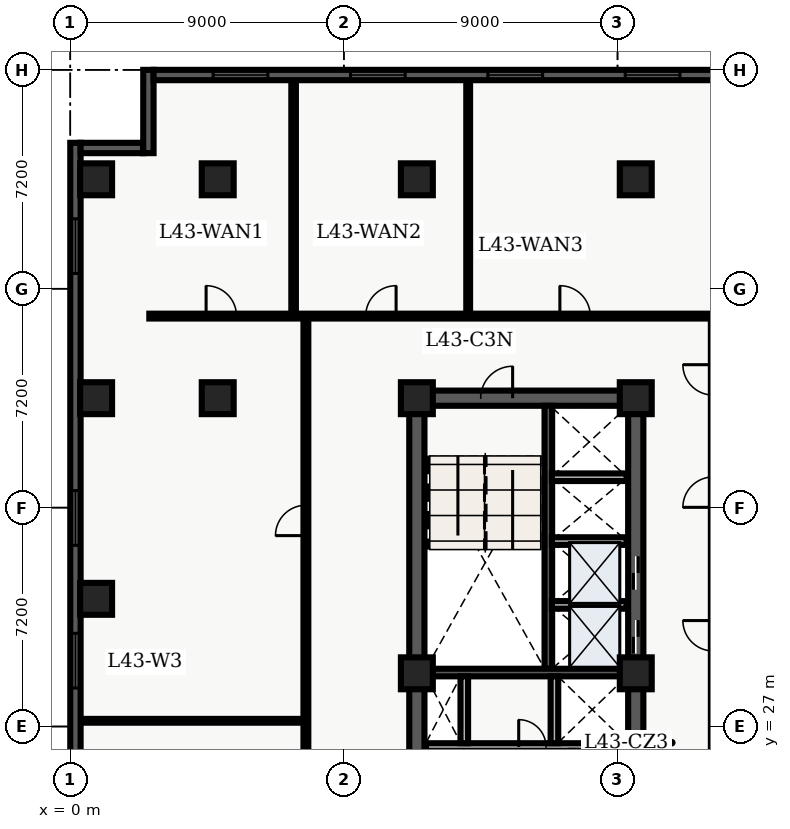
"""IFC4 building model, lengths in metres.
Left out: names, types, materials, properties, quantities, classifications, styles, units other than length and angle.
Written with IfcOpenShell. Run it as: python <this file> out.ifc"""

import sys

from ifc_helpers import new_model, entity, si_unit, converted_unit, direction, frame, origin_with_axes, origin_2d_with_axis, place, context, subcontext, project, spatial, polyline, rectangle, outline, extrude, element, fill, save


model = new_model("IFC4")
c1 = context("Model", 3, precision=1e-05, world=origin_with_axes(), true_north=direction((0.0, 1.0)))
c2 = subcontext(c1, "Body", "Model", "MODEL_VIEW")
j1 = project(units=[si_unit("LENGTHUNIT", "METRE"), converted_unit("PLANEANGLEUNIT", "DEGREE", entity("IfcPlaneAngleMeasure", 0.017), si_unit("PLANEANGLEUNIT", "RADIAN"), dimensions=[0, 0, 0, 0, 0, 0, 0])], contexts=[c1])
p1 = place(None, origin_with_axes())
s1 = spatial("IfcSite", under=j1, at=p1, CompositionType="ELEMENT")
p2 = place(p1, origin_with_axes())
s2 = spatial("IfcBuilding", under=s1, at=p2, CompositionType="ELEMENT")
p3 = place(p2, frame((0.0, 0.0, 175.8), z_axis=(0.0, 0.0, 1.0), x_axis=(1.0, 0.0, 0.0)))
s3 = spatial("IfcBuildingStorey", under=s2, at=p3, CompositionType="ELEMENT", Elevation=175.8)
p4 = place(p3, frame((11.4, 10.8, 0.0), z_axis=(0.0, 0.0, 1.0), x_axis=(0.0, 1.0, 0.0)))
e1 = element("IfcWall", 1, at=p4, inside=s3, PredefinedType="SHEAR", context=c2, shape_type="SweptSolid", body=[
    extrude(outline(polyline([(0.0, -0.25), (27.0, -0.25), (27.0, 0.25), (0.0, 0.25), (0.0, -0.25)])), origin_with_axes(), (0.0, 0.0, 1.0), 3.66),
])
p5 = place(p3, frame((11.4, 37.8, 0.0), z_axis=(0.0, 0.0, 1.0), x_axis=(1.0, 0.0, 0.0)))
e2 = element("IfcWall", 2, at=p5, inside=s3, PredefinedType="SHEAR", context=c2, shape_type="SweptSolid", body=[
    extrude(outline(polyline([(0.0, -0.25), (7.2, -0.25), (7.2, 0.25), (0.0, 0.25), (0.0, -0.25)])), origin_with_axes(), (0.0, 0.0, 1.0), 3.66),
])
p6 = place(p5, frame((2.625, 0.0, 0.0), z_axis=(0.0, 0.0, 1.0), x_axis=(1.0, 0.0, 0.0)))
e3 = element("IfcOpeningElement", 3, at=p6, cuts=e2, PredefinedType="OPENING", context=c2, shape_type="SweptSolid", body=[
    extrude(rectangle(XDim=1.05, YDim=0.52, at=origin_2d_with_axis()), origin_with_axes(), (0.0, 0.0, 1.0), 2.15),
])
p7 = place(p3, frame((18.6, 24.3, 0.0), z_axis=(0.0, 0.0, 1.0), x_axis=(0.0, 1.0, 0.0)))
e4 = element("IfcWall", 4, at=p7, inside=s3, PredefinedType="SHEAR", context=c2, shape_type="SweptSolid", body=[
    extrude(outline(polyline([(0.0, -0.25), (13.5, -0.25), (13.5, 0.25), (0.0, 0.25), (0.0, -0.25)])), origin_with_axes(), (0.0, 0.0, 1.0), 3.66),
])
p8 = place(p7, frame((5.65, 0.0, 0.0), z_axis=(0.0, 0.0, 1.0), x_axis=(1.0, 0.0, 0.0)))
e5 = element("IfcOpeningElement", 5, at=p8, cuts=e4, PredefinedType="OPENING", context=c2, shape_type="SweptSolid", body=[
    extrude(rectangle(XDim=1.1, YDim=0.52, at=origin_2d_with_axis()), origin_with_axes(), (0.0, 0.0, 1.0), 2.15),
])
p9 = place(p7, frame((7.75, 0.0, 0.0), z_axis=(0.0, 0.0, 1.0), x_axis=(1.0, 0.0, 0.0)))
e6 = element("IfcOpeningElement", 6, at=p9, cuts=e4, PredefinedType="OPENING", context=c2, shape_type="SweptSolid", body=[
    extrude(rectangle(XDim=1.1, YDim=0.52, at=origin_2d_with_axis()), origin_with_axes(), (0.0, 0.0, 1.0), 2.15),
])
p10 = place(p3, frame((15.725, 28.9, 0.0), z_axis=(0.0, 0.0, 1.0), x_axis=(0.0, 1.0, 0.0)))
e7 = element("IfcWall", 7, at=p10, inside=s3, PredefinedType="SHEAR", context=c2, shape_type="SweptSolid", body=[
    extrude(outline(polyline([(0.0, -0.125), (8.65, -0.125), (8.65, 0.125), (0.0, 0.125), (0.0, -0.125)])), origin_with_axes(), (0.0, 0.0, 1.0), 3.66),
])
p11 = place(p3, frame((11.65, 28.775, 0.0), z_axis=(0.0, 0.0, 1.0), x_axis=(1.0, 0.0, 0.0)))
e8 = element("IfcWall", 8, at=p11, inside=s3, PredefinedType="SHEAR", context=c2, shape_type="SweptSolid", body=[
    extrude(outline(polyline([(0.0, -0.125), (6.7, -0.125), (6.7, 0.125), (0.0, 0.125), (0.0, -0.125)])), origin_with_axes(), (0.0, 0.0, 1.0), 3.66),
])
p12 = place(p3, frame((11.7, 26.325, 0.0), z_axis=(0.0, 0.0, 1.0), x_axis=(1.0, 0.0, 0.0)))
e9 = element("IfcWall", 9, at=p12, inside=s3, PredefinedType="SOLIDWALL", context=c2, shape_type="SweptSolid", body=[
    extrude(outline(polyline([(0.0, -0.125), (6.6, -0.125), (6.6, 0.125), (0.0, 0.125), (0.0, -0.125)])), origin_with_axes(), (0.0, 0.0, 1.0), 2.7),
])
p13 = place(p12, frame((3.5, 0.0, 0.0), z_axis=(0.0, 0.0, 1.0), x_axis=(1.0, 0.0, 0.0)))
e10 = element("IfcOpeningElement", 10, at=p13, cuts=e9, PredefinedType="OPENING", context=c2, shape_type="SweptSolid", body=[
    extrude(rectangle(XDim=0.9, YDim=0.27, at=origin_2d_with_axis()), origin_with_axes(), (0.0, 0.0, 1.0), 2.15),
])
for number, where, z_axis, x_axis in (
    (11, (12.96, 26.45, 0.0), (0.0, 0.0, 1.0), (0.0, 1.0, 0.0)),
    (12, (15.925, 26.45, 0.0), (0.0, 0.0, 1.0), (0.0, 1.0, 0.0)),
):
    element("IfcWall", number, at=place(p3, frame(where, z_axis=z_axis, x_axis=x_axis)), inside=s3, PredefinedType="SOLIDWALL", context=c2, shape_type="SweptSolid", body=[
        extrude(outline(polyline([(0.0, -0.125), (2.2, -0.125), (2.2, 0.125), (0.0, 0.125), (0.0, -0.125)])), origin_with_axes(), (0.0, 0.0, 1.0), 2.7),
    ])
for number, where, z_axis, x_axis in (
    (13, (11.4, 28.75, 0.0), (0.0, 0.0, 1.0), (1.0, 0.0, 0.0)),
    (14, (11.4, 37.8, 0.0), (0.0, 0.0, 1.0), (1.0, 0.0, 0.0)),
    (15, (11.4, 45.0, 0.0), (0.0, 0.0, 1.0), (1.0, 0.0, 0.0)),
    (16, (18.6, 28.75, 0.0), (0.0, 0.0, 1.0), (1.0, 0.0, 0.0)),
    (17, (18.6, 37.8, 0.0), (0.0, 0.0, 1.0), (1.0, 0.0, 0.0)),
    (18, (18.6, 45.0, 0.0), (0.0, 0.0, 1.0), (1.0, 0.0, 0.0)),
    (19, (4.85, 37.8, 0.0), (0.0, 0.0, 1.0), (1.0, 0.0, 0.0)),
    (20, (4.85, 45.0, 0.0), (0.0, 0.0, 1.0), (1.0, 0.0, 0.0)),
    (21, (0.85, 31.2, 0.0), (0.0, 0.0, 1.0), (1.0, 0.0, 0.0)),
    (22, (0.85, 37.8, 0.0), (0.0, 0.0, 1.0), (1.0, 0.0, 0.0)),
    (23, (0.85, 45.0, 0.0), (0.0, 0.0, 1.0), (1.0, 0.0, 0.0)),
):
    element("IfcColumn", number, at=place(p3, frame(where, z_axis=z_axis, x_axis=x_axis)), inside=s3, PredefinedType="COLUMN", context=c2, shape_type="SweptSolid", body=[
        extrude(rectangle(XDim=1.05, YDim=1.05, at=origin_2d_with_axis()), origin_with_axes(), (0.0, 0.0, 1.0), 3.9),
    ])
for number, where, z_axis, x_axis in (
    (24, (15.84, 31.0, 0.0), (0.0, 0.0, 1.0), (1.0, 0.0, 0.0)),
    (25, (15.84, 33.1, 0.0), (0.0, 0.0, 1.0), (1.0, 0.0, 0.0)),
    (26, (15.84, 35.2, 0.0), (0.0, 0.0, 1.0), (1.0, 0.0, 0.0)),
):
    element("IfcWall", number, at=place(p3, frame(where, z_axis=z_axis, x_axis=x_axis)), inside=s3, PredefinedType="SOLIDWALL", context=c2, shape_type="SweptSolid", body=[
        extrude(outline(polyline([(0.0, -0.125), (2.46, -0.125), (2.46, 0.125), (0.0, 0.125), (0.0, -0.125)])), origin_with_axes(), (0.0, 0.0, 1.0), 2.7),
    ])
p14 = place(p3, frame((2.6, 40.5, 0.0), z_axis=(0.0, 0.0, 1.0), x_axis=(1.0, 0.0, 0.0)))
e27 = element("IfcWall", 27, at=p14, inside=s3, PredefinedType="PARTITIONING", context=c2, shape_type="SweptSolid", body=[
    extrude(outline(polyline([(0.0, -0.08), (22.318, -0.08), (22.318, 0.08), (0.0, 0.08), (0.0, -0.08)])), origin_with_axes(), (0.0, 0.0, 1.0), 2.7),
])
p15 = place(p14, frame((2.368, 0.0, 0.0), z_axis=(0.0, 0.0, 1.0), x_axis=(1.0, 0.0, 0.0)))
e28 = element("IfcOpeningElement", 28, at=p15, cuts=e27, PredefinedType="OPENING", context=c2, shape_type="SweptSolid", body=[
    extrude(rectangle(XDim=1.0, YDim=0.18, at=origin_2d_with_axis()), origin_with_axes(), (0.0, 0.0, 1.0), 2.15),
])
p16 = place(p14, frame((7.617, 0.0, 0.0), z_axis=(0.0, 0.0, 1.0), x_axis=(1.0, 0.0, 0.0)))
e29 = element("IfcOpeningElement", 29, at=p16, cuts=e27, PredefinedType="OPENING", context=c2, shape_type="SweptSolid", body=[
    extrude(rectangle(XDim=1.0, YDim=0.18, at=origin_2d_with_axis()), origin_with_axes(), (0.0, 0.0, 1.0), 2.15),
])
p17 = place(p14, frame((14.004, 0.0, 0.0), z_axis=(0.0, 0.0, 1.0), x_axis=(1.0, 0.0, 0.0)))
e30 = element("IfcOpeningElement", 30, at=p17, cuts=e27, PredefinedType="OPENING", context=c2, shape_type="SweptSolid", body=[
    extrude(rectangle(XDim=1.0, YDim=0.18, at=origin_2d_with_axis()), origin_with_axes(), (0.0, 0.0, 1.0), 2.15),
])
p18 = place(p3, frame((7.75, 7.8, 0.0), z_axis=(0.0, 0.0, 1.0), x_axis=(0.0, 1.0, 0.0)))
e31 = element("IfcWall", 31, at=p18, inside=s3, PredefinedType="PARTITIONING", context=c2, shape_type="SweptSolid", body=[
    extrude(outline(polyline([(0.0, -0.08), (32.7, -0.08), (32.7, 0.08), (0.0, 0.08), (0.0, -0.08)])), origin_with_axes(), (0.0, 0.0, 1.0), 2.7),
])
p19 = place(p18, frame((4.369, 0.0, 0.0), z_axis=(0.0, 0.0, 1.0), x_axis=(1.0, 0.0, 0.0)))
e32 = element("IfcOpeningElement", 32, at=p19, cuts=e31, PredefinedType="OPENING", context=c2, shape_type="SweptSolid", body=[
    extrude(rectangle(XDim=1.0, YDim=0.18, at=origin_2d_with_axis()), origin_with_axes(), (0.0, 0.0, 1.0), 2.15),
])
p20 = place(p18, frame((13.998, 0.0, 0.0), z_axis=(0.0, 0.0, 1.0), x_axis=(1.0, 0.0, 0.0)))
e33 = element("IfcOpeningElement", 33, at=p20, cuts=e31, PredefinedType="OPENING", context=c2, shape_type="SweptSolid", body=[
    extrude(rectangle(XDim=1.0, YDim=0.18, at=origin_2d_with_axis()), origin_with_axes(), (0.0, 0.0, 1.0), 2.15),
])
p21 = place(p18, frame((25.979, 0.0, 0.0), z_axis=(0.0, 0.0, 1.0), x_axis=(1.0, 0.0, 0.0)))
e34 = element("IfcOpeningElement", 34, at=p21, cuts=e31, PredefinedType="OPENING", context=c2, shape_type="SweptSolid", body=[
    extrude(rectangle(XDim=1.0, YDim=0.18, at=origin_2d_with_axis()), origin_with_axes(), (0.0, 0.0, 1.0), 2.15),
])
p22 = place(p3, frame((0.335, 27.188, 0.0), z_axis=(0.0, 0.0, 1.0), x_axis=(1.0, 0.0, 0.0)))
e35 = element("IfcWall", 35, at=p22, inside=s3, PredefinedType="PARTITIONING", context=c2, shape_type="SweptSolid", body=[
    extrude(outline(polyline([(0.0, -0.062), (7.295, -0.062), (7.295, 0.062), (0.0, 0.062), (0.0, -0.062)])), origin_with_axes(), (0.0, 0.0, 1.0), 2.7),
])
p23 = place(p3, frame((7.346, 40.6, 0.0), z_axis=(0.0, 0.0, 1.0), x_axis=(0.0, 1.0, 0.0)))
e36 = element("IfcWall", 36, at=p23, inside=s3, PredefinedType="PARTITIONING", context=c2, shape_type="SweptSolid", body=[
    extrude(outline(polyline([(0.0, -0.075), (7.665, -0.075), (7.665, 0.075), (0.0, 0.075), (0.0, -0.075)])), origin_with_axes(), (0.0, 0.0, 1.0), 2.7),
])
p24 = place(p3, frame((13.088, 40.6, 0.0), z_axis=(0.0, 0.0, 1.0), x_axis=(0.0, 1.0, 0.0)))
e37 = element("IfcWall", 37, at=p24, inside=s3, PredefinedType="PARTITIONING", context=c2, shape_type="SweptSolid", body=[
    extrude(outline(polyline([(0.0, -0.062), (7.665, -0.062), (7.665, 0.062), (0.0, 0.062), (0.0, -0.062)])), origin_with_axes(), (0.0, 0.0, 1.0), 2.7),
])
p25 = place(p3, frame((0.17, 2.74, 0.0), z_axis=(0.0, 0.0, 1.0), x_axis=(0.0, 1.0, 0.0)))
e38 = element("IfcWall", 38, at=p25, inside=s3, PredefinedType="SOLIDWALL", context=c2, shape_type="SweptSolid", body=[
    extrude(outline(polyline([(0.0, -0.17), (43.46, -0.17), (43.46, 0.17), (0.0, 0.17), (0.0, -0.17)])), origin_with_axes(), (0.0, 0.0, 1.0), 3.66),
])
p26 = place(p25, frame((2.948, 0.0, 0.45), z_axis=(0.0, 0.0, 1.0), x_axis=(1.0, 0.0, 0.0)))
e39 = element("IfcOpeningElement", 39, at=p26, cuts=e38, PredefinedType="OPENING", context=c2, shape_type="SweptSolid", body=[
    extrude(rectangle(XDim=1.8, YDim=0.36, at=origin_2d_with_axis()), origin_with_axes(), (0.0, 0.0, 1.0), 2.1),
])
p27 = place(p25, frame((11.889, 0.0, 0.45), z_axis=(0.0, 0.0, 1.0), x_axis=(1.0, 0.0, 0.0)))
e40 = element("IfcOpeningElement", 40, at=p27, cuts=e38, PredefinedType="OPENING", context=c2, shape_type="SweptSolid", body=[
    extrude(rectangle(XDim=1.8, YDim=0.36, at=origin_2d_with_axis()), origin_with_axes(), (0.0, 0.0, 1.0), 2.1),
])
p28 = place(p25, frame((17.484, 0.0, 0.45), z_axis=(0.0, 0.0, 1.0), x_axis=(1.0, 0.0, 0.0)))
e41 = element("IfcOpeningElement", 41, at=p28, cuts=e38, PredefinedType="OPENING", context=c2, shape_type="SweptSolid", body=[
    extrude(rectangle(XDim=1.8, YDim=0.36, at=origin_2d_with_axis()), origin_with_axes(), (0.0, 0.0, 1.0), 2.1),
])
p29 = place(p25, frame((21.73, 0.0, 0.45), z_axis=(0.0, 0.0, 1.0), x_axis=(1.0, 0.0, 0.0)))
e42 = element("IfcOpeningElement", 42, at=p29, cuts=e38, PredefinedType="OPENING", context=c2, shape_type="SweptSolid", body=[
    extrude(rectangle(XDim=1.8, YDim=0.36, at=origin_2d_with_axis()), origin_with_axes(), (0.0, 0.0, 1.0), 2.1),
])
p30 = place(p25, frame((26.426, 0.0, 0.45), z_axis=(0.0, 0.0, 1.0), x_axis=(1.0, 0.0, 0.0)))
e43 = element("IfcOpeningElement", 43, at=p30, cuts=e38, PredefinedType="OPENING", context=c2, shape_type="SweptSolid", body=[
    extrude(rectangle(XDim=1.8, YDim=0.36, at=origin_2d_with_axis()), origin_with_axes(), (0.0, 0.0, 1.0), 2.1),
])
p31 = place(p25, frame((31.121, 0.0, 0.45), z_axis=(0.0, 0.0, 1.0), x_axis=(1.0, 0.0, 0.0)))
e44 = element("IfcOpeningElement", 44, at=p31, cuts=e38, PredefinedType="OPENING", context=c2, shape_type="SweptSolid", body=[
    extrude(rectangle(XDim=1.8, YDim=0.36, at=origin_2d_with_axis()), origin_with_axes(), (0.0, 0.0, 1.0), 2.1),
])
p32 = place(p25, frame((40.062, 0.0, 0.45), z_axis=(0.0, 0.0, 1.0), x_axis=(1.0, 0.0, 0.0)))
e45 = element("IfcOpeningElement", 45, at=p32, cuts=e38, PredefinedType="OPENING", context=c2, shape_type="SweptSolid", body=[
    extrude(rectangle(XDim=1.8, YDim=0.36, at=origin_2d_with_axis()), origin_with_axes(), (0.0, 0.0, 1.0), 2.1),
])
p33 = place(p3, frame((0.34, 46.03, 0.0), z_axis=(0.0, 0.0, 1.0), x_axis=(1.0, 0.0, 0.0)))
e46 = element("IfcWall", 46, at=p33, inside=s3, PredefinedType="SOLIDWALL", context=c2, shape_type="SweptSolid", body=[
    extrude(outline(polyline([(0.0, -0.17), (2.06, -0.17), (2.06, 0.17), (0.0, 0.17), (0.0, -0.17)])), origin_with_axes(), (0.0, 0.0, 1.0), 3.66),
])
p34 = place(p3, frame((2.57, 45.86, 0.0), z_axis=(0.0, 0.0, 1.0), x_axis=(0.0, 1.0, 0.0)))
e47 = element("IfcWall", 47, at=p34, inside=s3, PredefinedType="SOLIDWALL", context=c2, shape_type="SweptSolid", body=[
    extrude(outline(polyline([(0.0, -0.17), (2.74, -0.17), (2.74, 0.17), (0.0, 0.17), (0.0, -0.17)])), origin_with_axes(), (0.0, 0.0, 1.0), 3.66),
])
p35 = place(p3, frame((2.74, 48.43, 0.0), z_axis=(0.0, 0.0, 1.0), x_axis=(1.0, 0.0, 0.0)))
e48 = element("IfcWall", 48, at=p35, inside=s3, PredefinedType="SOLIDWALL", context=c2, shape_type="SweptSolid", body=[
    extrude(outline(polyline([(0.0, -0.17), (19.273, -0.17), (19.273, 0.17), (0.0, 0.17), (0.0, -0.17)])), origin_with_axes(), (0.0, 0.0, 1.0), 3.66),
])
p36 = place(p35, frame((2.859, 0.0, 0.45), z_axis=(0.0, 0.0, 1.0), x_axis=(1.0, 0.0, 0.0)))
e49 = element("IfcOpeningElement", 49, at=p36, cuts=e48, PredefinedType="OPENING", context=c2, shape_type="SweptSolid", body=[
    extrude(rectangle(XDim=1.8, YDim=0.36, at=origin_2d_with_axis()), origin_with_axes(), (0.0, 0.0, 1.0), 2.1),
])
p37 = place(p35, frame((7.377, 0.0, 0.45), z_axis=(0.0, 0.0, 1.0), x_axis=(1.0, 0.0, 0.0)))
e50 = element("IfcOpeningElement", 50, at=p37, cuts=e48, PredefinedType="OPENING", context=c2, shape_type="SweptSolid", body=[
    extrude(rectangle(XDim=1.8, YDim=0.36, at=origin_2d_with_axis()), origin_with_axes(), (0.0, 0.0, 1.0), 2.1),
])
p38 = place(p35, frame((11.896, 0.0, 0.45), z_axis=(0.0, 0.0, 1.0), x_axis=(1.0, 0.0, 0.0)))
e51 = element("IfcOpeningElement", 51, at=p38, cuts=e48, PredefinedType="OPENING", context=c2, shape_type="SweptSolid", body=[
    extrude(rectangle(XDim=1.8, YDim=0.36, at=origin_2d_with_axis()), origin_with_axes(), (0.0, 0.0, 1.0), 2.1),
])
p39 = place(p35, frame((16.414, 0.0, 0.45), z_axis=(0.0, 0.0, 1.0), x_axis=(1.0, 0.0, 0.0)))
e52 = element("IfcOpeningElement", 52, at=p39, cuts=e48, PredefinedType="OPENING", context=c2, shape_type="SweptSolid", body=[
    extrude(rectangle(XDim=1.8, YDim=0.36, at=origin_2d_with_axis()), origin_with_axes(), (0.0, 0.0, 1.0), 2.1),
])
p40 = place(p7, frame((5.65, 0.0, 0.0), z_axis=(0.0, 0.0, 1.0), x_axis=(1.0, 0.0, 0.0)))
e53 = element("IfcDoor", 53, at=p40, inside=s3, OperationType="SLIDING_TO_LEFT", PredefinedType="DOOR", context=c2, shape_type="SweptSolid", body=[
    extrude(rectangle(XDim=1.1, YDim=0.09, at=origin_2d_with_axis()), origin_with_axes(), (0.0, 0.0, 1.0), 2.15),
])
fill(e5, e53)
p41 = place(p7, frame((7.75, 0.0, 0.0), z_axis=(0.0, 0.0, 1.0), x_axis=(1.0, 0.0, 0.0)))
e54 = element("IfcDoor", 54, at=p41, inside=s3, OperationType="SLIDING_TO_RIGHT", PredefinedType="DOOR", context=c2, shape_type="SweptSolid", body=[
    extrude(rectangle(XDim=1.1, YDim=0.09, at=origin_2d_with_axis()), origin_with_axes(), (0.0, 0.0, 1.0), 2.15),
])
fill(e6, e54)
p42 = place(p5, frame((2.625, 0.0, 0.0), z_axis=(0.0, 0.0, 1.0), x_axis=(1.0, 0.0, 0.0)))
e55 = element("IfcDoor", 55, at=p42, inside=s3, OperationType="SINGLE_SWING_RIGHT", PredefinedType="DOOR", context=c2, shape_type="SweptSolid", body=[
    extrude(rectangle(XDim=1.05, YDim=0.09, at=origin_2d_with_axis()), origin_with_axes(), (0.0, 0.0, 1.0), 2.15),
])
fill(e3, e55)
p43 = place(p12, frame((3.5, 0.0, 0.0), z_axis=(0.0, 0.0, 1.0), x_axis=(1.0, 0.0, 0.0)))
e56 = element("IfcDoor", 56, at=p43, inside=s3, OperationType="SINGLE_SWING_LEFT", PredefinedType="DOOR", context=c2, shape_type="SweptSolid", body=[
    extrude(rectangle(XDim=0.9, YDim=0.09, at=origin_2d_with_axis()), origin_with_axes(), (0.0, 0.0, 1.0), 2.15),
])
fill(e10, e56)
p44 = place(p18, frame((25.979, 0.0, 0.0), z_axis=(0.0, 0.0, 1.0), x_axis=(1.0, 0.0, 0.0)))
e57 = element("IfcDoor", 57, at=p44, inside=s3, OperationType="SINGLE_SWING_LEFT", PredefinedType="DOOR", context=c2, shape_type="SweptSolid", body=[
    extrude(rectangle(XDim=1.0, YDim=0.09, at=origin_2d_with_axis()), origin_with_axes(), (0.0, 0.0, 1.0), 2.15),
])
fill(e34, e57)
p45 = place(p14, frame((2.368, 0.0, 0.0), z_axis=(0.0, 0.0, 1.0), x_axis=(1.0, 0.0, 0.0)))
e58 = element("IfcDoor", 58, at=p45, inside=s3, OperationType="SINGLE_SWING_LEFT", PredefinedType="DOOR", context=c2, shape_type="SweptSolid", body=[
    extrude(rectangle(XDim=1.0, YDim=0.09, at=origin_2d_with_axis()), origin_with_axes(), (0.0, 0.0, 1.0), 2.15),
])
fill(e28, e58)
p46 = place(p14, frame((7.617, 0.0, 0.0), z_axis=(0.0, 0.0, 1.0), x_axis=(1.0, 0.0, 0.0)))
e59 = element("IfcDoor", 59, at=p46, inside=s3, OperationType="SINGLE_SWING_RIGHT", PredefinedType="DOOR", context=c2, shape_type="SweptSolid", body=[
    extrude(rectangle(XDim=1.0, YDim=0.09, at=origin_2d_with_axis()), origin_with_axes(), (0.0, 0.0, 1.0), 2.15),
])
fill(e29, e59)
p47 = place(p14, frame((14.004, 0.0, 0.0), z_axis=(0.0, 0.0, 1.0), x_axis=(1.0, 0.0, 0.0)))
e60 = element("IfcDoor", 60, at=p47, inside=s3, OperationType="SINGLE_SWING_LEFT", PredefinedType="DOOR", context=c2, shape_type="SweptSolid", body=[
    extrude(rectangle(XDim=1.0, YDim=0.09, at=origin_2d_with_axis()), origin_with_axes(), (0.0, 0.0, 1.0), 2.15),
])
fill(e30, e60)
p48 = place(p25, frame((26.426, 0.0, 0.45), z_axis=(0.0, 0.0, 1.0), x_axis=(1.0, 0.0, 0.0)))
e61 = element("IfcWindow", 61, at=p48, inside=s3, PredefinedType="WINDOW", context=c2, shape_type="SweptSolid", body=[
    extrude(rectangle(XDim=1.8, YDim=0.09, at=origin_2d_with_axis()), origin_with_axes(), (0.0, 0.0, 1.0), 2.1),
])
fill(e43, e61)
p49 = place(p25, frame((31.121, 0.0, 0.45), z_axis=(0.0, 0.0, 1.0), x_axis=(1.0, 0.0, 0.0)))
e62 = element("IfcWindow", 62, at=p49, inside=s3, PredefinedType="WINDOW", context=c2, shape_type="SweptSolid", body=[
    extrude(rectangle(XDim=1.8, YDim=0.09, at=origin_2d_with_axis()), origin_with_axes(), (0.0, 0.0, 1.0), 2.1),
])
fill(e44, e62)
p50 = place(p25, frame((40.062, 0.0, 0.45), z_axis=(0.0, 0.0, 1.0), x_axis=(1.0, 0.0, 0.0)))
e63 = element("IfcWindow", 63, at=p50, inside=s3, PredefinedType="WINDOW", context=c2, shape_type="SweptSolid", body=[
    extrude(rectangle(XDim=1.8, YDim=0.09, at=origin_2d_with_axis()), origin_with_axes(), (0.0, 0.0, 1.0), 2.1),
])
fill(e45, e63)
p51 = place(p35, frame((2.859, 0.0, 0.45), z_axis=(0.0, 0.0, 1.0), x_axis=(1.0, 0.0, 0.0)))
e64 = element("IfcWindow", 64, at=p51, inside=s3, PredefinedType="WINDOW", context=c2, shape_type="SweptSolid", body=[
    extrude(rectangle(XDim=1.8, YDim=0.09, at=origin_2d_with_axis()), origin_with_axes(), (0.0, 0.0, 1.0), 2.1),
])
fill(e49, e64)
p52 = place(p35, frame((7.377, 0.0, 0.45), z_axis=(0.0, 0.0, 1.0), x_axis=(1.0, 0.0, 0.0)))
e65 = element("IfcWindow", 65, at=p52, inside=s3, PredefinedType="WINDOW", context=c2, shape_type="SweptSolid", body=[
    extrude(rectangle(XDim=1.8, YDim=0.09, at=origin_2d_with_axis()), origin_with_axes(), (0.0, 0.0, 1.0), 2.1),
])
fill(e50, e65)
p53 = place(p35, frame((11.896, 0.0, 0.45), z_axis=(0.0, 0.0, 1.0), x_axis=(1.0, 0.0, 0.0)))
e66 = element("IfcWindow", 66, at=p53, inside=s3, PredefinedType="WINDOW", context=c2, shape_type="SweptSolid", body=[
    extrude(rectangle(XDim=1.8, YDim=0.09, at=origin_2d_with_axis()), origin_with_axes(), (0.0, 0.0, 1.0), 2.1),
])
fill(e51, e66)
p54 = place(p35, frame((16.414, 0.0, 0.45), z_axis=(0.0, 0.0, 1.0), x_axis=(1.0, 0.0, 0.0)))
e67 = element("IfcWindow", 67, at=p54, inside=s3, PredefinedType="WINDOW", context=c2, shape_type="SweptSolid", body=[
    extrude(rectangle(XDim=1.8, YDim=0.09, at=origin_2d_with_axis()), origin_with_axes(), (0.0, 0.0, 1.0), 2.1),
])
fill(e52, e67)
save(model, sys.argv[1])
